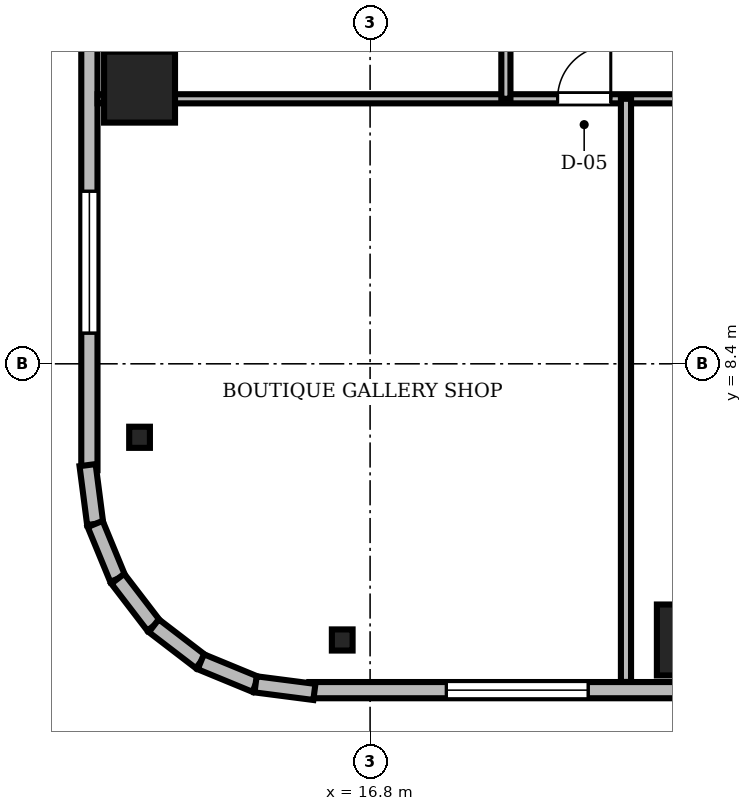
"""IFC4 building model, lengths in metres.
Left out: names, types, materials, properties, quantities, classifications, styles, units other than length and angle.
Written with IfcOpenShell. Run it as: python <this file> out.ifc"""

import sys

from ifc_helpers import new_model, si_unit, direction, frame, frame_2d, origin, origin_2d, place, context, subcontext, project, spatial, rectangle, i_section, extrude, source, transform, mapped, element, fill, save


model = new_model("IFC4")
c1 = context("Model", 3, precision=1e-05, world=origin(), true_north=direction((0.0, 1.0)))
c2 = subcontext(c1, "Body", "Model", "MODEL_VIEW")
j1 = project(units=[si_unit("LENGTHUNIT", "METRE"), si_unit("PLANEANGLEUNIT", "RADIAN")], contexts=[c1])
p1 = place(None, origin())
s1 = spatial("IfcSite", under=j1, at=p1, CompositionType="ELEMENT")
p2 = place(p1, origin())
s2 = spatial("IfcBuilding", under=s1, at=p2, CompositionType="ELEMENT")
p3 = place(p2, frame((0.0, 0.0, 196.05)))
s3 = spatial("IfcBuildingStorey", under=s2, at=p3, CompositionType="ELEMENT", Elevation=196.05)
m1 = source(origin(), c2, "Body", "SweptSolid", [
    extrude(rectangle(XDim=1.4, YDim=1.4, at=origin_2d()), origin(), (0.0, 0.0, 1.0), 3.53),
])
for number, where, z_axis, x_axis in (
    (1, (23.16, 2.95, 0.0), (0.0, 0.0, 1.0), (1.0, 0.0, 0.0)),
    (2, (12.25, 13.86, 0.0), (0.0, 0.0, 1.0), (1.0, 0.0, 0.0)),
):
    element("IfcColumn", number, at=place(p3, frame(where, z_axis=z_axis, x_axis=x_axis)), inside=s3, PredefinedType="COLUMN", context=c2, shape_type="MappedRepresentation", body=[
        mapped(m1, transform((0.0, 0.0, 0.0), scale=1.0)),
    ])
m2 = source(origin(), c2, "Body", "SweptSolid", [
    extrude(i_section(OverallWidth=0.409, OverallDepth=0.417, WebThickness=0.021, FlangeThickness=0.033, FilletRadius=0.015, at=origin_2d()), origin(), (0.0, 0.0, 1.0), 3.53),
])
for number, where, z_axis, x_axis in (
    (3, (16.25, 2.95, 0.0), (0.0, 0.0, 1.0), (1.0, 0.0, 0.0)),
    (4, (12.25, 6.95, 0.0), (0.0, 0.0, 1.0), (1.0, 0.0, 0.0)),
):
    element("IfcColumn", number, at=place(p3, frame(where, z_axis=z_axis, x_axis=x_axis)), inside=s3, PredefinedType="COLUMN", context=c2, shape_type="MappedRepresentation", body=[
        mapped(m2, transform((0.0, 0.0, 0.0), scale=1.0)),
    ])
m3 = source(origin(), c2, "Body", "SweptSolid", [
    extrude(rectangle(XDim=15.6, YDim=0.32, at=frame_2d((7.8, 0.0))), origin(), (0.0, 0.0, 1.0), 3.53),
])
p4 = place(p3, frame((15.6, 1.96, 0.0), z_axis=(0.0, 0.0, 1.0), x_axis=(1.0, 0.0, 0.0)))
e5 = element("IfcWall", 5, at=p4, inside=s3, PredefinedType="SOLIDWALL", context=c2, shape_type="MappedRepresentation", body=[
    mapped(m3, transform((0.0, 0.0, 0.0), scale=1.0)),
])
m4 = source(origin(), c2, "Body", "SweptSolid", [
    extrude(rectangle(XDim=1.4, YDim=2.3, at=frame_2d((0.7, 1.15))), frame((0.0, 0.17, 0.0), z_axis=(0.0, -1.0, 0.0), x_axis=(1.0, 0.0, 0.0)), (0.0, 0.0, 1.0), 0.34),
])
p5 = place(p4, frame((9.61, 0.0, 0.0)))
e6 = element("IfcOpeningElement", 6, at=p5, cuts=e5, PredefinedType="OPENING", context=c2, shape_type="MappedRepresentation", body=[
    mapped(m4, transform((0.0, 0.0, 0.0), scale=1.0)),
])
m5 = source(origin(), c2, "Body", "SweptSolid", [
    extrude(rectangle(XDim=2.8, YDim=2.4, at=frame_2d((1.4, 1.2))), frame((0.0, 0.17, 0.0), z_axis=(0.0, -1.0, 0.0), x_axis=(1.0, 0.0, 0.0)), (0.0, 0.0, 1.0), 0.34),
])
p6 = place(p4, frame((2.705, 0.0, 0.72)))
e7 = element("IfcOpeningElement", 7, at=p6, cuts=e5, PredefinedType="OPENING", context=c2, shape_type="MappedRepresentation", body=[
    mapped(m5, transform((0.0, 0.0, 0.0), scale=1.0)),
])
p7 = place(p3, frame((11.26, 21.9, 0.0), z_axis=(0.0, 0.0, 1.0), x_axis=(0.0, -1.0, 0.0)))
e8 = element("IfcWall", 8, at=p7, inside=s3, PredefinedType="SOLIDWALL", context=c2, shape_type="MappedRepresentation", body=[
    mapped(m3, transform((0.0, 0.0, 0.0), scale=1.0)),
])
p8 = place(p7, frame((10.095, 0.0, 0.72)))
e9 = element("IfcOpeningElement", 9, at=p8, cuts=e8, PredefinedType="OPENING", context=c2, shape_type="MappedRepresentation", body=[
    mapped(m5, transform((0.0, 0.0, 0.0), scale=1.0)),
])
m6 = source(origin(), c2, "Body", "SweptSolid", [
    extrude(rectangle(XDim=1.171, YDim=0.32, at=frame_2d((0.585, 0.0))), origin(), (0.0, 0.0, 1.0), 3.53),
])
p9 = place(p3, frame((11.224, 6.401, 0.0), z_axis=(0.0, 0.0, 1.0), x_axis=(0.128269133229, -0.991739395941, 0.0)))
e10 = element("IfcWall", 10, at=p9, inside=s3, PredefinedType="SOLIDWALL", context=c2, shape_type="MappedRepresentation", body=[
    mapped(m6, transform((0.0, 0.0, 0.0), scale=1.0)),
])
m7 = source(origin(), c2, "Body", "SweptSolid", [
    extrude(rectangle(XDim=1.169, YDim=0.32, at=frame_2d((0.584, 0.0))), origin(), (0.0, 0.0, 1.0), 3.53),
])
for number, where, z_axis, x_axis in (
    (11, (11.375, 5.24, 0.0), (0.0, 0.0, 1.0), (0.381, -0.925, 0.0)),
    (12, (11.82, 4.159, 0.0), (0.0, 0.0, 1.0), (0.608, -0.794, 0.0)),
):
    element("IfcWall", number, at=place(p3, frame(where, z_axis=z_axis, x_axis=x_axis)), inside=s3, PredefinedType="SOLIDWALL", context=c2, shape_type="MappedRepresentation", body=[
        mapped(m7, transform((0.0, 0.0, 0.0), scale=1.0)),
    ])
m8 = source(origin(), c2, "Body", "SweptSolid", [
    extrude(rectangle(XDim=1.169, YDim=0.32, at=frame_2d((0.584, 0.0))), origin(), (0.0, 0.0, 1.0), 3.53),
])
p10 = place(p3, frame((12.531, 3.231, 0.0), z_axis=(0.0, 0.0, 1.0), x_axis=(0.793663520347, -0.608356981114, 0.0)))
e13 = element("IfcWall", 13, at=p10, inside=s3, PredefinedType="SOLIDWALL", context=c2, shape_type="MappedRepresentation", body=[
    mapped(m8, transform((0.0, 0.0, 0.0), scale=1.0)),
])
m9 = source(origin(), c2, "Body", "SweptSolid", [
    extrude(rectangle(XDim=1.169, YDim=0.32, at=frame_2d((0.585, 0.0))), origin(), (0.0, 0.0, 1.0), 3.53),
])
p11 = place(p3, frame((13.459, 2.52, 0.0), z_axis=(0.0, 0.0, 1.0), x_axis=(0.924479075121, -0.381232789334, 0.0)))
e14 = element("IfcWall", 14, at=p11, inside=s3, PredefinedType="SOLIDWALL", context=c2, shape_type="MappedRepresentation", body=[
    mapped(m9, transform((0.0, 0.0, 0.0), scale=1.0)),
])
m10 = source(origin(), c2, "Body", "SweptSolid", [
    extrude(rectangle(XDim=1.17, YDim=0.32, at=frame_2d((0.585, 0.0))), origin(), (0.0, 0.0, 1.0), 3.53),
])
p12 = place(p3, frame((14.54, 2.074, 0.0), z_axis=(0.0, 0.0, 1.0), x_axis=(0.991762485493, -0.128090485085, 0.0)))
e15 = element("IfcWall", 15, at=p12, inside=s3, PredefinedType="SOLIDWALL", context=c2, shape_type="MappedRepresentation", body=[
    mapped(m10, transform((0.0, 0.0, 0.0), scale=1.0)),
])
m11 = source(origin(), c2, "Body", "SweptSolid", [
    extrude(rectangle(XDim=46.156, YDim=0.18, at=frame_2d((23.078, 0.0))), origin(), (0.0, 0.0, 1.0), 2.772),
])
p13 = place(p3, frame((11.422, 13.63, 0.0), z_axis=(0.0, 0.0, 1.0), x_axis=(1.0, 0.0, 0.0)))
e16 = element("IfcWall", 16, at=p13, inside=s3, PredefinedType="PARTITIONING", context=c2, shape_type="MappedRepresentation", body=[
    mapped(m11, transform((0.0, 0.0, 0.0), scale=1.0)),
])
m12 = source(origin(), c2, "Body", "SweptSolid", [
    extrude(rectangle(XDim=1.05, YDim=2.2, at=frame_2d((0.525, 1.1))), frame((0.0, 0.1, 0.0), z_axis=(0.0, -1.0, 0.0), x_axis=(1.0, 0.0, 0.0)), (0.0, 0.0, 1.0), 0.2),
])
p14 = place(p13, frame((9.078, 0.0, 0.0)))
e17 = element("IfcOpeningElement", 17, at=p14, cuts=e16, PredefinedType="OPENING", context=c2, shape_type="MappedRepresentation", body=[
    mapped(m12, transform((0.0, 0.0, 0.0), scale=1.0)),
])
p15 = place(p13, frame((12.538, 0.0, 0.0)))
e18 = element("IfcOpeningElement", 18, at=p15, cuts=e16, PredefinedType="OPENING", context=c2, shape_type="MappedRepresentation", body=[
    mapped(m12, transform((0.0, 0.0, 0.0), scale=1.0)),
])
p16 = place(p13, frame((16.982, 0.0, 0.0)))
e19 = element("IfcOpeningElement", 19, at=p16, cuts=e16, PredefinedType="OPENING", context=c2, shape_type="MappedRepresentation", body=[
    mapped(m12, transform((0.0, 0.0, 0.0), scale=1.0)),
])
p17 = place(p13, frame((21.393, 0.0, 0.0)))
e20 = element("IfcOpeningElement", 20, at=p17, cuts=e16, PredefinedType="OPENING", context=c2, shape_type="MappedRepresentation", body=[
    mapped(m12, transform((0.0, 0.0, 0.0), scale=1.0)),
])
m13 = source(origin(), c2, "Body", "SweptSolid", [
    extrude(rectangle(XDim=0.95, YDim=2.15, at=frame_2d((0.475, 1.075))), frame((0.0, 0.1, 0.0), z_axis=(0.0, -1.0, 0.0), x_axis=(1.0, 0.0, 0.0)), (0.0, 0.0, 1.0), 0.2),
])
p18 = place(p13, frame((27.812, 0.0, 0.0)))
e21 = element("IfcOpeningElement", 21, at=p18, cuts=e16, PredefinedType="OPENING", context=c2, shape_type="MappedRepresentation", body=[
    mapped(m13, transform((0.0, 0.0, 0.0), scale=1.0)),
])
p19 = place(p13, frame((32.531, 0.0, 0.0)))
e22 = element("IfcOpeningElement", 22, at=p19, cuts=e16, PredefinedType="OPENING", context=c2, shape_type="MappedRepresentation", body=[
    mapped(m12, transform((0.0, 0.0, 0.0), scale=1.0)),
])
p20 = place(p13, frame((37.498, 0.0, 0.0)))
e23 = element("IfcOpeningElement", 23, at=p20, cuts=e16, PredefinedType="OPENING", context=c2, shape_type="MappedRepresentation", body=[
    mapped(m12, transform((0.0, 0.0, 0.0), scale=1.0)),
])
m14 = source(origin(), c2, "Body", "SweptSolid", [
    extrude(rectangle(XDim=14.92, YDim=0.18, at=frame_2d((7.46, 0.0))), origin(), (0.0, 0.0, 1.0), 2.972),
])
p21 = place(p3, frame((19.48, 13.63, 0.0), z_axis=(0.0, 0.0, 1.0), x_axis=(0.0, 1.0, 0.0)))
e24 = element("IfcWall", 24, at=p21, inside=s3, PredefinedType="PARTITIONING", context=c2, shape_type="MappedRepresentation", body=[
    mapped(m14, transform((0.0, 0.0, 0.0), scale=1.0)),
])
p22 = place(p21, frame((1.942, 0.0, 0.0)))
e25 = element("IfcOpeningElement", 25, at=p22, cuts=e24, PredefinedType="OPENING", context=c2, shape_type="MappedRepresentation", body=[
    mapped(m12, transform((0.0, 0.0, 0.0), scale=1.0)),
])
p23 = place(p21, frame((8.09, 0.0, 0.0)))
e26 = element("IfcOpeningElement", 26, at=p23, cuts=e24, PredefinedType="OPENING", context=c2, shape_type="MappedRepresentation", body=[
    mapped(m13, transform((0.0, 0.0, 0.0), scale=1.0)),
])
p24 = place(p21, frame((11.788, 0.0, 0.0)))
e27 = element("IfcOpeningElement", 27, at=p24, cuts=e24, PredefinedType="OPENING", context=c2, shape_type="MappedRepresentation", body=[
    mapped(m12, transform((0.0, 0.0, 0.0), scale=1.0)),
])
m15 = source(origin(), c2, "Body", "SweptSolid", [
    extrude(rectangle(XDim=11.508, YDim=0.2, at=frame_2d((5.754, 0.0))), origin(), (0.0, 0.0, 1.0), 2.772),
])
p25 = place(p3, frame((21.85, 2.122, 0.0), z_axis=(0.0, 0.0, 1.0), x_axis=(0.0, 1.0, 0.0)))
e28 = element("IfcWall", 28, at=p25, inside=s3, PredefinedType="PARTITIONING", context=c2, shape_type="MappedRepresentation", body=[
    mapped(m15, transform((0.0, 0.0, 0.0), scale=1.0)),
])
m16 = source(origin(), c2, "Body", "SweptSolid", [
    extrude(rectangle(XDim=2.8, YDim=2.4, at=frame_2d((1.4, 1.2))), frame((0.0, 0.03, 0.0), z_axis=(0.0, -1.0, 0.0), x_axis=(1.0, 0.0, 0.0)), (0.0, 0.0, 1.0), 0.06),
])
p26 = place(p6, origin())
e29 = element("IfcWindow", 29, at=p26, inside=s3, PartitioningType="SINGLE_PANEL", PredefinedType="WINDOW", context=c2, shape_type="MappedRepresentation", body=[
    mapped(m16, transform((0.0, 0.0, 0.0), scale=1.0)),
])
fill(e7, e29)
p27 = place(p8, origin())
e30 = element("IfcWindow", 30, at=p27, inside=s3, PartitioningType="SINGLE_PANEL", PredefinedType="WINDOW", context=c2, shape_type="MappedRepresentation", body=[
    mapped(m16, transform((0.0, 0.0, 0.0), scale=1.0)),
])
fill(e9, e30)
m17 = source(origin(), c2, "Body", "SweptSolid", [
    extrude(rectangle(XDim=1.05, YDim=2.2, at=frame_2d((0.525, 1.1))), frame((0.0, 0.025, 0.0), z_axis=(0.0, -1.0, 0.0), x_axis=(1.0, 0.0, 0.0)), (0.0, 0.0, 1.0), 0.05),
])
p28 = place(p14, origin())
e31 = element("IfcDoor", 31, at=p28, inside=s3, OperationType="SINGLE_SWING_RIGHT", PredefinedType="DOOR", context=c2, shape_type="MappedRepresentation", body=[
    mapped(m17, transform((0.0, 0.0, 0.0), scale=1.0)),
])
fill(e17, e31)
save(model, sys.argv[1])
